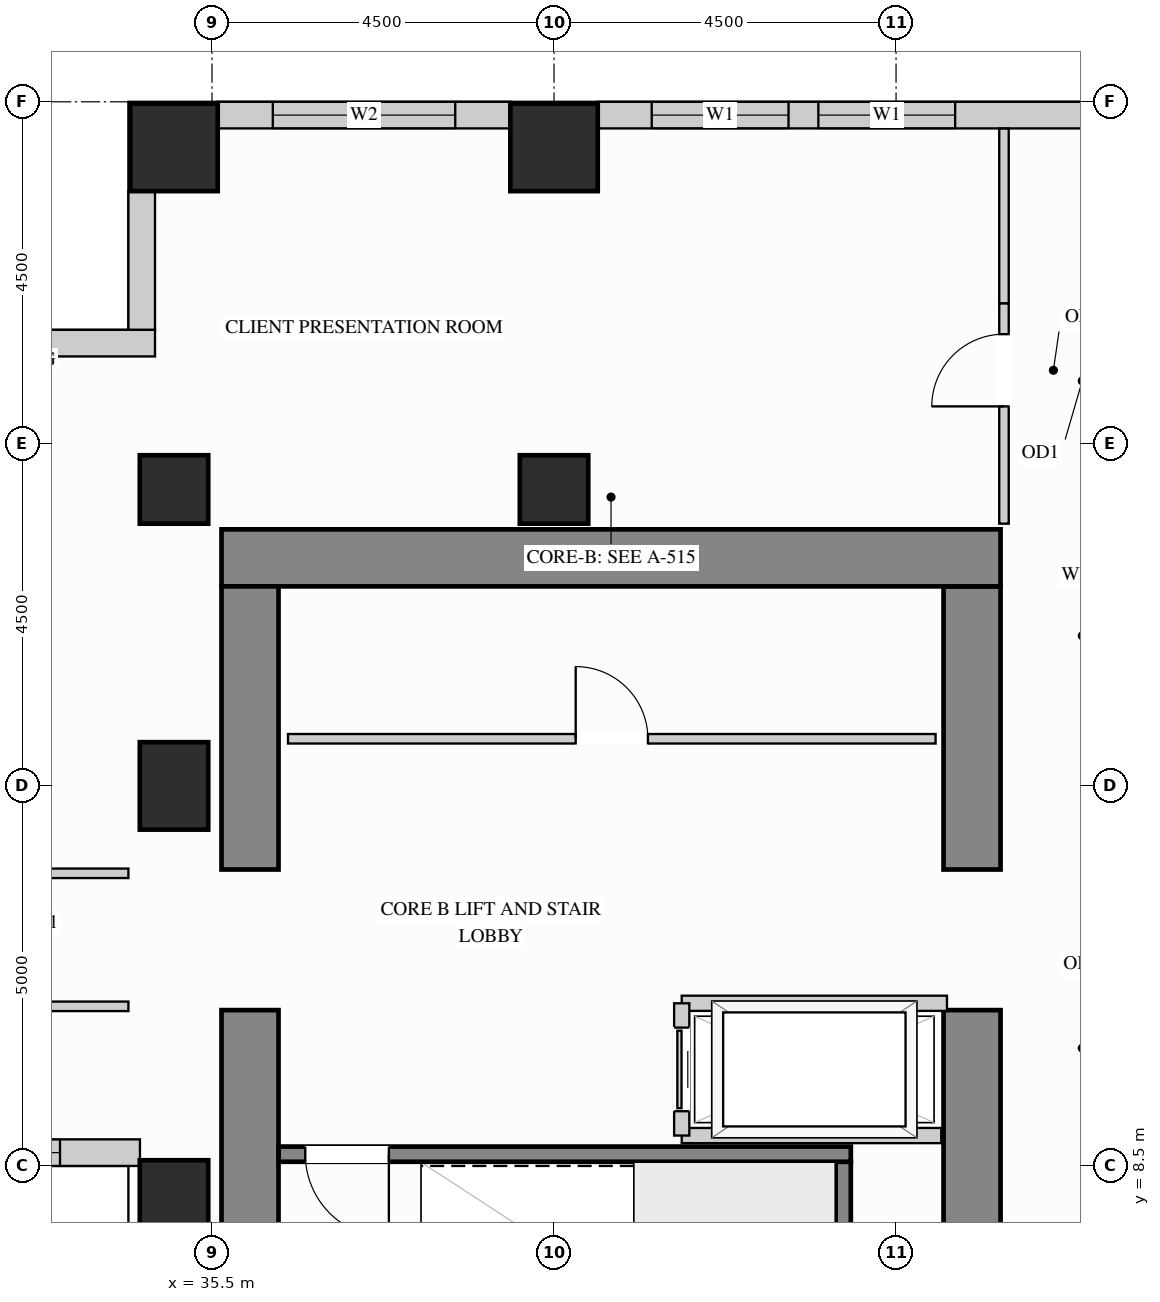
"""IFC4 building model, lengths in metres.
Left out: names, types, materials, properties, quantities, classifications, styles, units other than length and angle.
Written with IfcOpenShell. Run it as: python <this file> out.ifc"""

import sys

from ifc_helpers import new_model, si_unit, direction, frame, frame_2d, origin, origin_2d, place, context, subcontext, project, spatial, rectangle, extrude, source, transform, mapped, element, fill, save


model = new_model("IFC4")
c1 = context("Model", 3, precision=1e-05, world=origin(), true_north=direction((0.0, 1.0)))
c2 = subcontext(c1, "Body", "Model", "MODEL_VIEW")
j1 = project(units=[si_unit("LENGTHUNIT", "METRE"), si_unit("PLANEANGLEUNIT", "RADIAN")], contexts=[c1])
p1 = place(None, origin())
s1 = spatial("IfcSite", under=j1, at=p1, CompositionType="ELEMENT")
p2 = place(p1, origin())
s2 = spatial("IfcBuilding", under=s1, at=p2, CompositionType="ELEMENT")
p3 = place(p2, frame((0.0, 0.0, 135.0)))
s3 = spatial("IfcBuildingStorey", under=s2, at=p3, CompositionType="ELEMENT", Elevation=135.0)
m1 = source(origin(), c2, "Body", "SweptSolid", [
    extrude(rectangle(XDim=0.9, YDim=0.9, at=origin_2d()), origin(), (0.0, 0.0, 1.0), 3.32),
])
for number, where, z_axis, x_axis in (
    (1, (35.0, 17.4, 0.0), (0.0, 0.0, 1.0), (1.0, 0.0, 0.0)),
    (2, (40.0, 17.4, 0.0), (0.0, 0.0, 1.0), (1.0, 0.0, 0.0)),
):
    element("IfcColumn", number, at=place(p3, frame(where, z_axis=z_axis, x_axis=x_axis)), inside=s3, PredefinedType="COLUMN", context=c2, shape_type="MappedRepresentation", body=[
        mapped(m1, transform((0.0, 0.0, 0.0), x_axis=(1.0, 0.0, 0.0), y_axis=(0.0, 1.0, 0.0), z_axis=(0.0, 0.0, 1.0))),
    ])
m2 = source(origin(), c2, "Body", "SweptSolid", [
    extrude(rectangle(XDim=0.9, YDim=1.15, at=origin_2d()), origin(), (0.0, 0.0, 1.0), 3.32),
])
for number, where, z_axis, x_axis in (
    (3, (35.0, 13.5, 0.0), (0.0, 0.0, 1.0), (1.0, 0.0, 0.0)),
    (4, (35.0, 8.0, 0.0), (0.0, 0.0, 1.0), (1.0, 0.0, 0.0)),
):
    element("IfcColumn", number, at=place(p3, frame(where, z_axis=z_axis, x_axis=x_axis)), inside=s3, PredefinedType="COLUMN", context=c2, shape_type="MappedRepresentation", body=[
        mapped(m2, transform((0.0, 0.0, 0.0), x_axis=(1.0, 0.0, 0.0), y_axis=(0.0, 1.0, 0.0), z_axis=(0.0, 0.0, 1.0))),
    ])
m3 = source(origin(), c2, "Body", "SweptSolid", [
    extrude(rectangle(XDim=1.15, YDim=1.15, at=origin_2d()), origin(), (0.0, 0.0, 1.0), 3.32),
])
for number, where, z_axis, x_axis in (
    (5, (35.0, 21.9, 0.0), (0.0, 0.0, 1.0), (1.0, 0.0, 0.0)),
    (6, (40.0, 21.9, 0.0), (0.0, 0.0, 1.0), (1.0, 0.0, 0.0)),
):
    element("IfcColumn", number, at=place(p3, frame(where, z_axis=z_axis, x_axis=x_axis)), inside=s3, PredefinedType="COLUMN", context=c2, shape_type="MappedRepresentation", body=[
        mapped(m3, transform((0.0, 0.0, 0.0), x_axis=(1.0, 0.0, 0.0), y_axis=(0.0, 1.0, 0.0), z_axis=(0.0, 0.0, 1.0))),
    ])
m4 = source(origin(), c2, "Body", "SweptSolid", [
    extrude(rectangle(XDim=5.675, YDim=0.75, at=frame_2d((2.837, 0.0))), origin(), (0.0, 0.0, 1.0), 3.32),
])
p4 = place(p3, frame((45.5, 4.875, 0.0), z_axis=(0.0, 0.0, 1.0), x_axis=(0.0, 1.0, 0.0)))
e7 = element("IfcWall", 7, at=p4, inside=s3, PredefinedType="SHEAR", context=c2, shape_type="MappedRepresentation", body=[
    mapped(m4, transform((0.0, 0.0, 0.0), x_axis=(1.0, 0.0, 0.0), y_axis=(0.0, 1.0, 0.0), z_axis=(0.0, 0.0, 1.0))),
])
m5 = source(origin(), c2, "Body", "SweptSolid", [
    extrude(rectangle(XDim=3.725, YDim=0.75, at=frame_2d((1.863, 0.0))), origin(), (0.0, 0.0, 1.0), 3.32),
])
p5 = place(p3, frame((45.5, 12.4, 0.0), z_axis=(0.0, 0.0, 1.0), x_axis=(0.0, 1.0, 0.0)))
e8 = element("IfcWall", 8, at=p5, inside=s3, PredefinedType="SHEAR", context=c2, shape_type="MappedRepresentation", body=[
    mapped(m5, transform((0.0, 0.0, 0.0), x_axis=(1.0, 0.0, 0.0), y_axis=(0.0, 1.0, 0.0), z_axis=(0.0, 0.0, 1.0))),
])
m6 = source(origin(), c2, "Body", "SweptSolid", [
    extrude(rectangle(XDim=10.25, YDim=0.75, at=frame_2d((5.125, 0.0))), origin(), (0.0, 0.0, 1.0), 3.32),
])
p6 = place(p3, frame((35.625, 16.5, 0.0), z_axis=(0.0, 0.0, 1.0), x_axis=(1.0, 0.0, 0.0)))
e9 = element("IfcWall", 9, at=p6, inside=s3, PredefinedType="SHEAR", context=c2, shape_type="MappedRepresentation", body=[
    mapped(m6, transform((0.0, 0.0, 0.0), x_axis=(1.0, 0.0, 0.0), y_axis=(0.0, 1.0, 0.0), z_axis=(0.0, 0.0, 1.0))),
])
p7 = place(p3, frame((36.0, 4.875, 0.0), z_axis=(0.0, 0.0, 1.0), x_axis=(0.0, 1.0, 0.0)))
e10 = element("IfcWall", 10, at=p7, inside=s3, PredefinedType="SHEAR", context=c2, shape_type="MappedRepresentation", body=[
    mapped(m4, transform((0.0, 0.0, 0.0), x_axis=(1.0, 0.0, 0.0), y_axis=(0.0, 1.0, 0.0), z_axis=(0.0, 0.0, 1.0))),
])
p8 = place(p3, frame((36.0, 12.4, 0.0), z_axis=(0.0, 0.0, 1.0), x_axis=(0.0, 1.0, 0.0)))
e11 = element("IfcWall", 11, at=p8, inside=s3, PredefinedType="SHEAR", context=c2, shape_type="MappedRepresentation", body=[
    mapped(m5, transform((0.0, 0.0, 0.0), x_axis=(1.0, 0.0, 0.0), y_axis=(0.0, 1.0, 0.0), z_axis=(0.0, 0.0, 1.0))),
])
p9 = place(p3, frame((30.948, 8.675, 0.0), z_axis=(0.0, 0.0, 1.0), x_axis=(1.0, 0.0, 0.0)))
e12 = element("IfcWall", 12, at=p9, inside=s3, PredefinedType="SOLIDWALL", context=c2, shape_type="SweptSolid", body=[
    extrude(rectangle(XDim=3.604, YDim=0.35, at=frame_2d((1.802, 0.0))), origin(), (0.0, 0.0, 1.0), 3.305),
])
p10 = place(p9, frame((1.052, 0.0, 0.78)))
e13 = element("IfcOpeningElement", 13, at=p10, cuts=e12, PredefinedType="OPENING", context=c2, shape_type="SweptSolid", body=[
    extrude(rectangle(XDim=1.5, YDim=2.0, at=frame_2d((0.75, 1.0))), frame((0.0, 0.185, 0.0), z_axis=(0.0, -1.0, 0.0), x_axis=(1.0, 0.0, 0.0)), (0.0, 0.0, 1.0), 0.37),
])
p11 = place(p3, frame((47.027, 22.325, 0.0), z_axis=(0.0, 0.0, 1.0), x_axis=(-1.0, 0.0, 0.0)))
e14 = element("IfcWall", 14, at=p11, inside=s3, PredefinedType="SOLIDWALL", context=c2, shape_type="SweptSolid", body=[
    extrude(rectangle(XDim=6.454, YDim=0.35, at=frame_2d((3.227, 0.0))), origin(), (0.0, 0.0, 1.0), 3.305),
])
p12 = place(p11, frame((1.749, 0.0, 0.78)))
e15 = element("IfcOpeningElement", 15, at=p12, cuts=e14, PredefinedType="OPENING", context=c2, shape_type="SweptSolid", body=[
    extrude(rectangle(XDim=1.8, YDim=2.1, at=frame_2d((0.9, 1.05))), frame((0.0, 0.185, 0.0), z_axis=(0.0, -1.0, 0.0), x_axis=(1.0, 0.0, 0.0)), (0.0, 0.0, 1.0), 0.37),
])
p13 = place(p11, frame((3.942, 0.0, 0.78)))
e16 = element("IfcOpeningElement", 16, at=p13, cuts=e14, PredefinedType="OPENING", context=c2, shape_type="SweptSolid", body=[
    extrude(rectangle(XDim=1.8, YDim=2.1, at=frame_2d((0.9, 1.05))), frame((0.0, 0.185, 0.0), z_axis=(0.0, -1.0, 0.0), x_axis=(1.0, 0.0, 0.0)), (0.0, 0.0, 1.0), 0.37),
])
p14 = place(p3, frame((39.427, 22.325, 0.0), z_axis=(0.0, 0.0, 1.0), x_axis=(-1.0, 0.0, 0.0)))
e17 = element("IfcWall", 17, at=p14, inside=s3, PredefinedType="SOLIDWALL", context=c2, shape_type="SweptSolid", body=[
    extrude(rectangle(XDim=3.854, YDim=0.35, at=frame_2d((1.927, 0.0))), origin(), (0.0, 0.0, 1.0), 3.305),
])
p15 = place(p14, frame((0.727, 0.0, 0.78)))
e18 = element("IfcOpeningElement", 18, at=p15, cuts=e17, PredefinedType="OPENING", context=c2, shape_type="SweptSolid", body=[
    extrude(rectangle(XDim=2.4, YDim=2.1, at=frame_2d((1.2, 1.05))), frame((0.0, 0.185, 0.0), z_axis=(0.0, -1.0, 0.0), x_axis=(1.0, 0.0, 0.0)), (0.0, 0.0, 1.0), 0.37),
])
m7 = source(origin(), c2, "Body", "SweptSolid", [
    extrude(rectangle(XDim=1.829, YDim=0.35, at=frame_2d((0.915, 0.0))), origin(), (0.0, 0.0, 1.0), 3.305),
])
p16 = place(p3, frame((34.575, 21.327, 0.0), z_axis=(0.0, 0.0, 1.0), x_axis=(0.0, -1.0, 0.0)))
e19 = element("IfcWall", 19, at=p16, inside=s3, PredefinedType="SOLIDWALL", context=c2, shape_type="MappedRepresentation", body=[
    mapped(m7, transform((0.0, 0.0, 0.0), x_axis=(1.0, 0.0, 0.0), y_axis=(0.0, 1.0, 0.0), z_axis=(0.0, 0.0, 1.0))),
])
p17 = place(p3, frame((34.75, 19.325, 0.0), z_axis=(0.0, 0.0, 1.0), x_axis=(-1.0, 0.0, 0.0)))
e20 = element("IfcWall", 20, at=p17, inside=s3, PredefinedType="SOLIDWALL", context=c2, shape_type="SweptSolid", body=[
    extrude(rectangle(XDim=15.6, YDim=0.35, at=frame_2d((7.8, 0.0))), origin(), (0.0, 0.0, 1.0), 3.305),
])
p18 = place(p17, frame((4.307, 0.0, 0.78)))
e21 = element("IfcOpeningElement", 21, at=p18, cuts=e20, PredefinedType="OPENING", context=c2, shape_type="SweptSolid", body=[
    extrude(rectangle(XDim=1.5, YDim=2.0, at=frame_2d((0.75, 1.0))), frame((0.0, 0.185, 0.0), z_axis=(0.0, -1.0, 0.0), x_axis=(1.0, 0.0, 0.0)), (0.0, 0.0, 1.0), 0.37),
])
p19 = place(p17, frame((9.793, 0.0, 0.78)))
e22 = element("IfcOpeningElement", 22, at=p19, cuts=e20, PredefinedType="OPENING", context=c2, shape_type="SweptSolid", body=[
    extrude(rectangle(XDim=1.5, YDim=2.0, at=frame_2d((0.75, 1.0))), frame((0.0, 0.185, 0.0), z_axis=(0.0, -1.0, 0.0), x_axis=(1.0, 0.0, 0.0)), (0.0, 0.0, 1.0), 0.37),
])
p20 = place(p3, frame((36.5, 14.12, 0.0), z_axis=(0.0, 0.0, 1.0), x_axis=(1.0, 0.0, 0.0)))
e23 = element("IfcWall", 23, at=p20, inside=s3, PredefinedType="PARTITIONING", context=c2, shape_type="SweptSolid", body=[
    extrude(rectangle(XDim=8.52, YDim=0.125, at=frame_2d((4.26, 0.0))), origin(), (0.0, 0.0, 1.0), 3.305),
])
p21 = place(p20, frame((3.785, 0.0, 0.0)))
e24 = element("IfcOpeningElement", 24, at=p21, cuts=e23, PredefinedType="OPENING", context=c2, shape_type="SweptSolid", body=[
    extrude(rectangle(XDim=0.95, YDim=2.15, at=frame_2d((0.475, 1.075))), frame((0.0, 0.073, 0.0), z_axis=(0.0, -1.0, 0.0), x_axis=(1.0, 0.0, 0.0)), (0.0, 0.0, 1.0), 0.145),
])
p22 = place(p3, frame((45.92, 16.95, 0.0), z_axis=(0.0, 0.0, 1.0), x_axis=(0.0, 1.0, 0.0)))
e25 = element("IfcWall", 25, at=p22, inside=s3, PredefinedType="PARTITIONING", context=c2, shape_type="SweptSolid", body=[
    extrude(rectangle(XDim=2.9, YDim=0.125, at=frame_2d((1.45, 0.0))), origin(), (0.0, 0.0, 1.0), 3.305),
])
p23 = place(p22, frame((1.543, 0.0, 0.0)))
e26 = element("IfcOpeningElement", 26, at=p23, cuts=e25, PredefinedType="OPENING", context=c2, shape_type="SweptSolid", body=[
    extrude(rectangle(XDim=0.95, YDim=2.15, at=frame_2d((0.475, 1.075))), frame((0.0, 0.073, 0.0), z_axis=(0.0, -1.0, 0.0), x_axis=(1.0, 0.0, 0.0)), (0.0, 0.0, 1.0), 0.145),
])
m8 = source(origin(), c2, "Body", "SweptSolid", [
    extrude(rectangle(XDim=2.298, YDim=0.125, at=frame_2d((1.149, 0.0))), origin(), (0.0, 0.0, 1.0), 3.305),
])
p24 = place(p3, frame((45.92, 19.85, 0.0), z_axis=(0.0, 0.0, 1.0), x_axis=(0.0, 1.0, 0.0)))
e27 = element("IfcWall", 27, at=p24, inside=s3, PredefinedType="PARTITIONING", context=c2, shape_type="MappedRepresentation", body=[
    mapped(m8, transform((0.0, 0.0, 0.0), x_axis=(1.0, 0.0, 0.0), y_axis=(0.0, 1.0, 0.0), z_axis=(0.0, 0.0, 1.0))),
])
p25 = place(p3, frame((29.85, 12.35, 0.0), z_axis=(0.0, 0.0, 1.0), x_axis=(1.0, 0.0, 0.0)))
e28 = element("IfcWall", 28, at=p25, inside=s3, PredefinedType="PARTITIONING", context=c2, shape_type="SweptSolid", body=[
    extrude(rectangle(XDim=4.55, YDim=0.125, at=frame_2d((2.275, 0.0))), origin(), (0.0, 0.0, 1.0), 3.305),
])
p26 = place(p25, frame((1.8, 0.0, 0.0)))
e29 = element("IfcOpeningElement", 29, at=p26, cuts=e28, PredefinedType="OPENING", context=c2, shape_type="SweptSolid", body=[
    extrude(rectangle(XDim=0.95, YDim=2.15, at=frame_2d((0.475, 1.075))), frame((0.0, 0.073, 0.0), z_axis=(0.0, -1.0, 0.0), x_axis=(1.0, 0.0, 0.0)), (0.0, 0.0, 1.0), 0.145),
])
p27 = place(p3, frame((29.85, 10.6, 0.0), z_axis=(0.0, 0.0, 1.0), x_axis=(1.0, 0.0, 0.0)))
e30 = element("IfcWall", 30, at=p27, inside=s3, PredefinedType="PARTITIONING", context=c2, shape_type="SweptSolid", body=[
    extrude(rectangle(XDim=4.55, YDim=0.125, at=frame_2d((2.275, 0.0))), origin(), (0.0, 0.0, 1.0), 3.305),
])
p28 = place(p27, frame((1.8, 0.0, 0.0)))
e31 = element("IfcOpeningElement", 31, at=p28, cuts=e30, PredefinedType="OPENING", context=c2, shape_type="SweptSolid", body=[
    extrude(rectangle(XDim=0.95, YDim=2.15, at=frame_2d((0.475, 1.075))), frame((0.0, 0.073, 0.0), z_axis=(0.0, -1.0, 0.0), x_axis=(1.0, 0.0, 0.0)), (0.0, 0.0, 1.0), 0.145),
])
m9 = source(origin(), c2, "Body", "SweptSolid", [
    extrude(rectangle(XDim=3.49, YDim=0.2, at=frame_2d((1.745, 0.0))), origin(), (0.0, 0.0, 1.0), 3.305),
])
p29 = place(p3, frame((41.68, 10.64, 0.0), z_axis=(0.0, 0.0, 1.0), x_axis=(1.0, 0.0, 0.0)))
e32 = element("IfcWall", 32, at=p29, inside=s3, PredefinedType="PARTITIONING", context=c2, shape_type="MappedRepresentation", body=[
    mapped(m9, transform((0.0, 0.0, 0.0), x_axis=(1.0, 0.0, 0.0), y_axis=(0.0, 1.0, 0.0), z_axis=(0.0, 0.0, 1.0))),
])
m10 = source(origin(), c2, "Body", "SweptSolid", [
    extrude(rectangle(XDim=3.415, YDim=0.2, at=frame_2d((1.708, 0.0))), origin(), (0.0, 0.0, 1.0), 3.305),
])
p30 = place(p3, frame((41.68, 8.9, 0.0), z_axis=(0.0, 0.0, 1.0), x_axis=(1.0, 0.0, 0.0)))
e33 = element("IfcWall", 33, at=p30, inside=s3, PredefinedType="PARTITIONING", context=c2, shape_type="MappedRepresentation", body=[
    mapped(m10, transform((0.0, 0.0, 0.0), x_axis=(1.0, 0.0, 0.0), y_axis=(0.0, 1.0, 0.0), z_axis=(0.0, 0.0, 1.0))),
])
p31 = place(p3, frame((41.68, 8.9, 0.0), z_axis=(0.0, 0.0, 1.0), x_axis=(0.0, 1.0, 0.0)))
e34 = element("IfcWall", 34, at=p31, inside=s3, PredefinedType="PARTITIONING", context=c2, shape_type="SweptSolid", body=[
    extrude(rectangle(XDim=1.74, YDim=0.2, at=frame_2d((0.87, 0.0))), origin(), (0.0, 0.0, 1.0), 3.305),
])
p32 = place(p31, frame((0.32, 0.0, 0.0)))
e35 = element("IfcOpeningElement", 35, at=p32, cuts=e34, PredefinedType="OPENING", context=c2, shape_type="SweptSolid", body=[
    extrude(rectangle(XDim=1.1, YDim=2.2, at=frame_2d((0.55, 1.1))), frame((0.0, 0.11, 0.0), z_axis=(0.0, -1.0, 0.0), x_axis=(1.0, 0.0, 0.0)), (0.0, 0.0, 1.0), 0.22),
])
m11 = source(origin(), c2, "Body", "SweptSolid", [
    extrude(rectangle(XDim=3.678, YDim=0.2, at=frame_2d((1.839, 0.0))), origin(), (0.0, 0.0, 1.0), 3.32),
])
p33 = place(p3, frame((43.805, 4.877, 0.0), z_axis=(0.0, 0.0, 1.0), x_axis=(0.0, 1.0, 0.0)))
e36 = element("IfcWall", 36, at=p33, inside=s3, PredefinedType="SHEAR", context=c2, shape_type="MappedRepresentation", body=[
    mapped(m11, transform((0.0, 0.0, 0.0), x_axis=(1.0, 0.0, 0.0), y_axis=(0.0, 1.0, 0.0), z_axis=(0.0, 0.0, 1.0))),
])
p34 = place(p3, frame((36.377, 8.655, 0.0), z_axis=(0.0, 0.0, 1.0), x_axis=(1.0, 0.0, 0.0)))
e37 = element("IfcWall", 37, at=p34, inside=s3, PredefinedType="SHEAR", context=c2, shape_type="SweptSolid", body=[
    extrude(rectangle(XDim=7.528, YDim=0.2, at=frame_2d((3.764, 0.0))), origin(), (0.0, 0.0, 1.0), 3.32),
])
p35 = place(p34, frame((0.35, 0.0, 0.0)))
e38 = element("IfcOpeningElement", 38, at=p35, cuts=e37, PredefinedType="OPENING", context=c2, shape_type="SweptSolid", body=[
    extrude(rectangle(XDim=1.1, YDim=2.15, at=frame_2d((0.55, 1.075))), frame((0.0, 0.11, 0.0), z_axis=(0.0, -1.0, 0.0), x_axis=(1.0, 0.0, 0.0)), (0.0, 0.0, 1.0), 0.22),
])
m12 = source(origin(), c2, "Body", "SweptSolid", [
    extrude(rectangle(XDim=1.1, YDim=2.2, at=frame_2d((0.55, 1.1))), frame((0.0, 0.025, 0.0), z_axis=(0.0, -1.0, 0.0), x_axis=(1.0, 0.0, 0.0)), (0.0, 0.0, 1.0), 0.05),
])
p36 = place(p32, origin())
e39 = element("IfcDoor", 39, at=p36, inside=s3, OperationType="SLIDING_TO_LEFT", PredefinedType="DOOR", context=c2, shape_type="MappedRepresentation", body=[
    mapped(m12, transform((0.0, 0.0, 0.0), x_axis=(1.0, 0.0, 0.0), y_axis=(0.0, 1.0, 0.0), z_axis=(0.0, 0.0, 1.0))),
])
fill(e35, e39)
m13 = source(origin(), c2, "Body", "SweptSolid", [
    extrude(rectangle(XDim=0.95, YDim=2.15, at=frame_2d((0.475, 1.075))), frame((0.0, 0.025, 0.0), z_axis=(0.0, -1.0, 0.0), x_axis=(1.0, 0.0, 0.0)), (0.0, 0.0, 1.0), 0.05),
])
p37 = place(p21, origin())
e40 = element("IfcDoor", 40, at=p37, inside=s3, OperationType="SINGLE_SWING_LEFT", PredefinedType="DOOR", context=c2, shape_type="MappedRepresentation", body=[
    mapped(m13, transform((0.0, 0.0, 0.0), x_axis=(1.0, 0.0, 0.0), y_axis=(0.0, 1.0, 0.0), z_axis=(0.0, 0.0, 1.0))),
])
fill(e24, e40)
p38 = place(p23, origin())
e41 = element("IfcDoor", 41, at=p38, inside=s3, OperationType="SINGLE_SWING_LEFT", PredefinedType="DOOR", context=c2, shape_type="MappedRepresentation", body=[
    mapped(m13, transform((0.0, 0.0, 0.0), x_axis=(1.0, 0.0, 0.0), y_axis=(0.0, 1.0, 0.0), z_axis=(0.0, 0.0, 1.0))),
])
fill(e26, e41)
m14 = source(origin(), c2, "Body", "SweptSolid", [
    extrude(rectangle(XDim=1.1, YDim=2.15, at=frame_2d((0.55, 1.075))), frame((0.0, 0.025, 0.0), z_axis=(0.0, -1.0, 0.0), x_axis=(1.0, 0.0, 0.0)), (0.0, 0.0, 1.0), 0.05),
])
p39 = place(p35, origin())
e42 = element("IfcDoor", 42, at=p39, inside=s3, OperationType="SINGLE_SWING_RIGHT", PredefinedType="DOOR", context=c2, shape_type="MappedRepresentation", body=[
    mapped(m14, transform((0.0, 0.0, 0.0), x_axis=(1.0, 0.0, 0.0), y_axis=(0.0, 1.0, 0.0), z_axis=(0.0, 0.0, 1.0))),
])
fill(e38, e42)
m15 = source(origin(), c2, "Body", "SweptSolid", [
    extrude(rectangle(XDim=1.8, YDim=2.1, at=frame_2d((0.9, 1.05))), frame((0.0, 0.03, 0.0), z_axis=(0.0, -1.0, 0.0), x_axis=(1.0, 0.0, 0.0)), (0.0, 0.0, 1.0), 0.06),
])
p40 = place(p12, origin())
e43 = element("IfcWindow", 43, at=p40, inside=s3, PartitioningType="SINGLE_PANEL", PredefinedType="WINDOW", context=c2, shape_type="MappedRepresentation", body=[
    mapped(m15, transform((0.0, 0.0, 0.0), x_axis=(1.0, 0.0, 0.0), y_axis=(0.0, 1.0, 0.0), z_axis=(0.0, 0.0, 1.0))),
])
fill(e15, e43)
p41 = place(p13, origin())
e44 = element("IfcWindow", 44, at=p41, inside=s3, PartitioningType="SINGLE_PANEL", PredefinedType="WINDOW", context=c2, shape_type="MappedRepresentation", body=[
    mapped(m15, transform((0.0, 0.0, 0.0), x_axis=(1.0, 0.0, 0.0), y_axis=(0.0, 1.0, 0.0), z_axis=(0.0, 0.0, 1.0))),
])
fill(e16, e44)
m16 = source(origin(), c2, "Body", "SweptSolid", [
    extrude(rectangle(XDim=2.4, YDim=2.1, at=frame_2d((1.2, 1.05))), frame((0.0, 0.03, 0.0), z_axis=(0.0, -1.0, 0.0), x_axis=(1.0, 0.0, 0.0)), (0.0, 0.0, 1.0), 0.06),
])
p42 = place(p15, origin())
e45 = element("IfcWindow", 45, at=p42, inside=s3, PartitioningType="SINGLE_PANEL", PredefinedType="WINDOW", context=c2, shape_type="MappedRepresentation", body=[
    mapped(m16, transform((0.0, 0.0, 0.0), x_axis=(1.0, 0.0, 0.0), y_axis=(0.0, 1.0, 0.0), z_axis=(0.0, 0.0, 1.0))),
])
fill(e18, e45)
m17 = source(origin(), c2, "Body", "SweptSolid", [
    extrude(rectangle(XDim=1.5, YDim=2.0, at=frame_2d((0.75, 1.0))), frame((0.0, 0.03, 0.0), z_axis=(0.0, -1.0, 0.0), x_axis=(1.0, 0.0, 0.0)), (0.0, 0.0, 1.0), 0.06),
])
p43 = place(p10, origin())
e46 = element("IfcWindow", 46, at=p43, inside=s3, PartitioningType="SINGLE_PANEL", PredefinedType="WINDOW", context=c2, shape_type="MappedRepresentation", body=[
    mapped(m17, transform((0.0, 0.0, 0.0), x_axis=(1.0, 0.0, 0.0), y_axis=(0.0, 1.0, 0.0), z_axis=(0.0, 0.0, 1.0))),
])
fill(e13, e46)
save(model, sys.argv[1])
